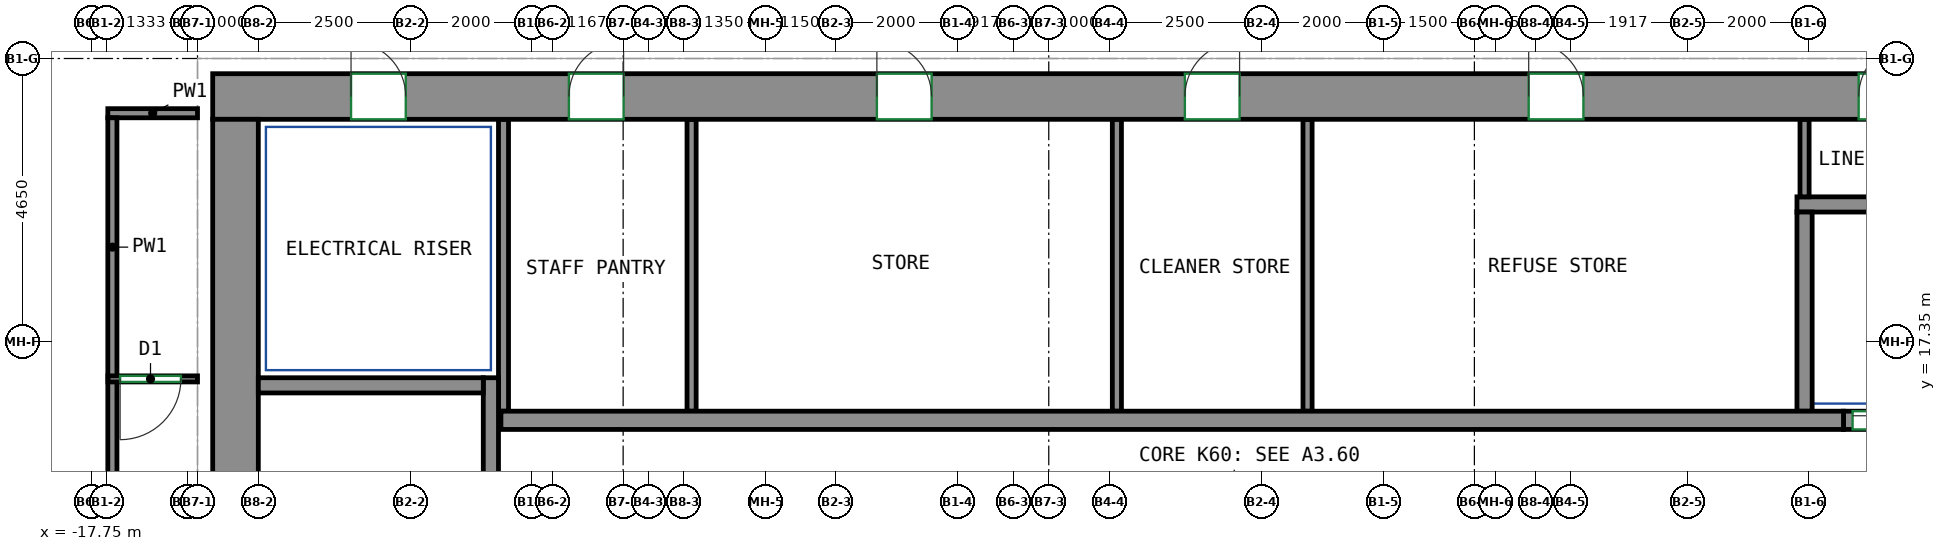
"""IFC4 building model, lengths in metres.
Left out: names, types, materials, properties, quantities, classifications, styles, units other than length and angle.
Written with IfcOpenShell. Run it as: python <this file> out.ifc"""

import sys

from ifc_helpers import new_model, si_unit, direction, frame, frame_2d, origin, place, context, subcontext, project, spatial, rectangle, extrude, source, transform, mapped, element, fill, save


model = new_model("IFC4")
c1 = context("Model", 3, precision=1e-05, world=origin(), true_north=direction((0.0, 1.0)))
c2 = subcontext(c1, "Body", "Model", "MODEL_VIEW")
j1 = project(units=[si_unit("LENGTHUNIT", "METRE"), si_unit("PLANEANGLEUNIT", "RADIAN")], contexts=[c1])
p1 = place(None, origin())
s1 = spatial("IfcSite", under=j1, at=p1, CompositionType="ELEMENT")
p2 = place(p1, origin())
s2 = spatial("IfcBuilding", under=s1, at=p2, CompositionType="ELEMENT")
p3 = place(p2, frame((0.0, 0.0, 245.8)))
s3 = spatial("IfcBuildingStorey", under=s2, at=p3, CompositionType="ELEMENT", Elevation=245.8)
m1 = source(origin(), c2, "Body", "SweptSolid", [
    extrude(rectangle(XDim=33.6, YDim=0.75, at=frame_2d((16.8, 0.0))), origin(), (0.0, 0.0, 1.0), 3.12),
])
p4 = place(p3, frame((-15.75, 21.375, 0.0), z_axis=(0.0, 0.0, 1.0), x_axis=(1.0, 0.0, 0.0)))
e1 = element("IfcWall", 1, at=p4, inside=s3, PredefinedType="SHEAR", context=c2, shape_type="MappedRepresentation", body=[
    mapped(m1, transform((0.0, 0.0, 0.0))),
])
p5 = place(p4, frame((5.858, 0.0, 0.0)))
e2 = element("IfcOpeningElement", 2, at=p5, cuts=e1, PredefinedType="OPENING", context=c2, shape_type="SweptSolid", body=[
    extrude(rectangle(XDim=0.9, YDim=2.1, at=frame_2d((0.45, 1.05))), frame((0.0, 0.385, 0.0), z_axis=(0.0, -1.0, 0.0), x_axis=(1.0, 0.0, 0.0)), (0.0, 0.0, 1.0), 0.77),
])
p6 = place(p4, frame((10.923, 0.0, 0.0)))
e3 = element("IfcOpeningElement", 3, at=p6, cuts=e1, PredefinedType="OPENING", context=c2, shape_type="SweptSolid", body=[
    extrude(rectangle(XDim=0.9, YDim=2.1, at=frame_2d((0.45, 1.05))), frame((0.0, 0.385, 0.0), z_axis=(0.0, -1.0, 0.0), x_axis=(1.0, 0.0, 0.0)), (0.0, 0.0, 1.0), 0.77),
])
p7 = place(p4, frame((15.988, 0.0, 0.0)))
e4 = element("IfcOpeningElement", 4, at=p7, cuts=e1, PredefinedType="OPENING", context=c2, shape_type="SweptSolid", body=[
    extrude(rectangle(XDim=0.9, YDim=2.1, at=frame_2d((0.45, 1.05))), frame((0.0, 0.385, 0.0), z_axis=(0.0, -1.0, 0.0), x_axis=(1.0, 0.0, 0.0)), (0.0, 0.0, 1.0), 0.77),
])
p8 = place(p4, frame((21.643, 0.0, 0.0)))
e5 = element("IfcOpeningElement", 5, at=p8, cuts=e1, PredefinedType="OPENING", context=c2, shape_type="SweptSolid", body=[
    extrude(rectangle(XDim=0.9, YDim=2.1, at=frame_2d((0.45, 1.05))), frame((0.0, 0.385, 0.0), z_axis=(0.0, -1.0, 0.0), x_axis=(1.0, 0.0, 0.0)), (0.0, 0.0, 1.0), 0.77),
])
p9 = place(p4, frame((27.07, 0.0, 0.0)))
e6 = element("IfcOpeningElement", 6, at=p9, cuts=e1, PredefinedType="OPENING", context=c2, shape_type="SweptSolid", body=[
    extrude(rectangle(XDim=0.9, YDim=2.1, at=frame_2d((0.45, 1.05))), frame((0.0, 0.385, 0.0), z_axis=(0.0, -1.0, 0.0), x_axis=(1.0, 0.0, 0.0)), (0.0, 0.0, 1.0), 0.77),
])
p10 = place(p4, frame((2.275, 0.0, 0.0)))
e7 = element("IfcOpeningElement", 7, at=p10, cuts=e1, PredefinedType="OPENING", context=c2, shape_type="SweptSolid", body=[
    extrude(rectangle(XDim=0.9, YDim=2.1, at=frame_2d((0.45, 1.05))), frame((0.0, 0.385, 0.0), z_axis=(0.0, -1.0, 0.0), x_axis=(1.0, 0.0, 0.0)), (0.0, 0.0, 1.0), 0.77),
])
p11 = place(p4, frame((30.425, 0.0, 0.0)))
e8 = element("IfcOpeningElement", 8, at=p11, cuts=e1, PredefinedType="OPENING", context=c2, shape_type="SweptSolid", body=[
    extrude(rectangle(XDim=0.9, YDim=2.1, at=frame_2d((0.45, 1.05))), frame((0.0, 0.385, 0.0), z_axis=(0.0, -1.0, 0.0), x_axis=(1.0, 0.0, 0.0)), (0.0, 0.0, 1.0), 0.77),
])
m2 = source(origin(), c2, "Body", "SweptSolid", [
    extrude(rectangle(XDim=12.0, YDim=0.75, at=frame_2d((6.0, 0.0))), origin(), (0.0, 0.0, 1.0), 3.12),
])
p12 = place(p3, frame((-15.375, 9.0, 0.0), z_axis=(0.0, 0.0, 1.0), x_axis=(0.0, 1.0, 0.0)))
e9 = element("IfcWall", 9, at=p12, inside=s3, PredefinedType="SHEAR", context=c2, shape_type="MappedRepresentation", body=[
    mapped(m2, transform((0.0, 0.0, 0.0))),
])
m3 = source(origin(), c2, "Body", "SweptSolid", [
    extrude(rectangle(XDim=7.75, YDim=0.25, at=frame_2d((3.875, 0.0))), origin(), (0.0, 0.0, 1.0), 3.12),
])
p13 = place(p3, frame((-11.175, 9.0, 0.0), z_axis=(0.0, 0.0, 1.0), x_axis=(0.0, 1.0, 0.0)))
e10 = element("IfcWall", 10, at=p13, inside=s3, PredefinedType="SHEAR", context=c2, shape_type="MappedRepresentation", body=[
    mapped(m3, transform((0.0, 0.0, 0.0))),
])
m4 = source(origin(), c2, "Body", "SweptSolid", [
    extrude(rectangle(XDim=3.7, YDim=0.25, at=frame_2d((1.85, 0.0))), origin(), (0.0, 0.0, 1.0), 3.12),
])
p14 = place(p3, frame((-15.0, 16.625, 0.0), z_axis=(0.0, 0.0, 1.0), x_axis=(1.0, 0.0, 0.0)))
e11 = element("IfcWall", 11, at=p14, inside=s3, PredefinedType="SHEAR", context=c2, shape_type="MappedRepresentation", body=[
    mapped(m4, transform((0.0, 0.0, 0.0))),
])
m5 = source(origin(), c2, "Body", "SweptSolid", [
    extrude(rectangle(XDim=22.08, YDim=0.3, at=frame_2d((11.04, 0.0))), origin(), (0.0, 0.0, 1.0), 3.12),
])
p15 = place(p3, frame((-11.01, 16.05, 0.0), z_axis=(0.0, 0.0, 1.0), x_axis=(1.0, 0.0, 0.0)))
e12 = element("IfcWall", 12, at=p15, inside=s3, PredefinedType="SHEAR", context=c2, shape_type="MappedRepresentation", body=[
    mapped(m5, transform((0.0, 0.0, 0.0))),
])
m6 = source(origin(), c2, "Body", "SweptSolid", [
    extrude(rectangle(XDim=1.4, YDim=0.3, at=frame_2d((0.7, 0.0))), origin(), (0.0, 0.0, 1.0), 3.12),
])
p16 = place(p3, frame((11.07, 16.05, 0.0), z_axis=(0.0, 0.0, 1.0), x_axis=(1.0, 0.0, 0.0)))
e13 = element("IfcWall", 13, at=p16, inside=s3, PredefinedType="PARTITIONING", context=c2, shape_type="MappedRepresentation", body=[
    mapped(m6, transform((0.0, 0.0, 0.0))),
])
p17 = place(p16, frame((0.15, 0.0, 0.0)))
e14 = element("IfcOpeningElement", 14, at=p17, cuts=e13, PredefinedType="OPENING", context=c2, shape_type="SweptSolid", body=[
    extrude(rectangle(XDim=1.1, YDim=2.1, at=frame_2d((0.55, 1.05))), frame((0.0, 0.16, 0.0), z_axis=(0.0, -1.0, 0.0), x_axis=(1.0, 0.0, 0.0)), (0.0, 0.0, 1.0), 0.32),
])
m7 = source(origin(), c2, "Body", "SweptSolid", [
    extrude(rectangle(XDim=2.93, YDim=0.25, at=frame_2d((1.465, 0.0))), origin(), (0.0, 0.0, 1.0), 3.12),
])
p18 = place(p3, frame((10.305, 19.6, 0.0), z_axis=(0.0, 0.0, 1.0), x_axis=(1.0, 0.0, 0.0)))
e15 = element("IfcWall", 15, at=p18, inside=s3, PredefinedType="PARTITIONING", context=c2, shape_type="MappedRepresentation", body=[
    mapped(m7, transform((0.0, 0.0, 0.0))),
])
m8 = source(origin(), c2, "Body", "SweptSolid", [
    extrude(rectangle(XDim=4.8, YDim=0.165, at=frame_2d((2.4, 0.0))), origin(), (0.0, 0.0, 1.0), 3.12),
])
p19 = place(p3, frame((-10.968, 16.2, 0.0), z_axis=(0.0, 0.0, 1.0), x_axis=(0.0, 1.0, 0.0)))
e16 = element("IfcWall", 16, at=p19, inside=s3, PredefinedType="PARTITIONING", context=c2, shape_type="MappedRepresentation", body=[
    mapped(m8, transform((0.0, 0.0, 0.0))),
])
m9 = source(origin(), c2, "Body", "SweptSolid", [
    extrude(rectangle(XDim=3.275, YDim=0.25, at=frame_2d((1.638, 0.0))), origin(), (0.0, 0.0, 1.0), 3.12),
])
p20 = place(p3, frame((10.43, 16.2, 0.0), z_axis=(0.0, 0.0, 1.0), x_axis=(0.0, 1.0, 0.0)))
e17 = element("IfcWall", 17, at=p20, inside=s3, PredefinedType="PARTITIONING", context=c2, shape_type="MappedRepresentation", body=[
    mapped(m9, transform((0.0, 0.0, 0.0))),
])
m10 = source(origin(), c2, "Body", "SweptSolid", [
    extrude(rectangle(XDim=4.8, YDim=0.15, at=frame_2d((2.4, 0.0))), origin(), (0.0, 0.0, 1.0), 3.12),
])
for number, where, z_axis, x_axis in (
    (18, (-7.875, 16.2, 0.0), (0.0, 0.0, 1.0), (0.0, 1.0, 0.0)),
    (19, (-0.88, 16.2, 0.0), (0.0, 0.0, 1.0), (0.0, 1.0, 0.0)),
    (20, (2.256, 16.2, 0.0), (0.0, 0.0, 1.0), (0.0, 1.0, 0.0)),
):
    element("IfcWall", number, at=place(p3, frame(where, z_axis=z_axis, x_axis=x_axis)), inside=s3, PredefinedType="PARTITIONING", context=c2, shape_type="MappedRepresentation", body=[
        mapped(m10, transform((0.0, 0.0, 0.0))),
    ])
m11 = source(origin(), c2, "Body", "SweptSolid", [
    extrude(rectangle(XDim=1.275, YDim=0.15, at=frame_2d((0.637, 0.0))), origin(), (0.0, 0.0, 1.0), 3.12),
])
p21 = place(p3, frame((10.43, 19.725, 0.0), z_axis=(0.0, 0.0, 1.0), x_axis=(0.0, 1.0, 0.0)))
e21 = element("IfcWall", 21, at=p21, inside=s3, PredefinedType="PARTITIONING", context=c2, shape_type="MappedRepresentation", body=[
    mapped(m11, transform((0.0, 0.0, 0.0))),
])
p22 = place(p3, frame((-17.4, 4.214, 0.0), z_axis=(0.0, 0.0, 1.0), x_axis=(0.0, 1.0, 0.0)))
e22 = element("IfcWall", 22, at=p22, inside=s3, PredefinedType="PARTITIONING", context=c2, shape_type="SweptSolid", body=[
    extrude(rectangle(XDim=12.477, YDim=0.15, at=frame_2d((6.238, 0.0))), origin(), (0.0, 0.0, 1.0), 3.12),
])
p23 = place(p3, frame((-17.475, 21.1, 0.0), z_axis=(0.0, 0.0, 1.0), x_axis=(1.0, 0.0, 0.0)))
e23 = element("IfcWall", 23, at=p23, inside=s3, PredefinedType="PARTITIONING", context=c2, shape_type="SweptSolid", body=[
    extrude(rectangle(XDim=1.475, YDim=0.15, at=frame_2d((0.738, 0.0))), origin(), (0.0, 0.0, 1.0), 3.12),
])
p24 = place(p3, frame((-17.4, 16.771, 0.0), z_axis=(0.0, 0.0, 1.0), x_axis=(0.0, 1.0, 0.0)))
e24 = element("IfcWall", 24, at=p24, inside=s3, PredefinedType="PARTITIONING", context=c2, shape_type="SweptSolid", body=[
    extrude(rectangle(XDim=4.254, YDim=0.15, at=frame_2d((2.127, 0.0))), origin(), (0.0, 0.0, 1.0), 3.12),
])
p25 = place(p3, frame((-16.0, 16.731, 0.0), z_axis=(0.0, 0.0, 1.0), x_axis=(-1.0, 0.0, 0.0)))
e25 = element("IfcWall", 25, at=p25, inside=s3, PredefinedType="PARTITIONING", context=c2, shape_type="SweptSolid", body=[
    extrude(rectangle(XDim=1.473, YDim=0.1, at=frame_2d((0.736, 0.0))), origin(), (0.0, 0.0, 1.0), 3.12),
])
p26 = place(p25, frame((0.273, 0.0, 0.0)))
e26 = element("IfcOpeningElement", 26, at=p26, cuts=e25, PredefinedType="OPENING", context=c2, shape_type="SweptSolid", body=[
    extrude(rectangle(XDim=1.0, YDim=2.1, at=frame_2d((0.5, 1.05))), frame((0.0, 0.06, 0.0), z_axis=(0.0, -1.0, 0.0), x_axis=(1.0, 0.0, 0.0)), (0.0, 0.0, 1.0), 0.12),
])
p27 = place(p17, origin())
e27 = element("IfcDoor", 27, at=p27, inside=s3, OperationType="DOUBLE_DOOR_SLIDING", PredefinedType="DOOR", context=c2, shape_type="SweptSolid", body=[
    extrude(rectangle(XDim=1.1, YDim=2.1, at=frame_2d((0.55, 1.05))), frame((0.0, 0.025, 0.0), z_axis=(0.0, -1.0, 0.0), x_axis=(1.0, 0.0, 0.0)), (0.0, 0.0, 1.0), 0.05),
])
fill(e14, e27)
p28 = place(p5, origin())
e28 = element("IfcDoor", 28, at=p28, inside=s3, OperationType="SINGLE_SWING_RIGHT", PredefinedType="DOOR", context=c2, shape_type="SweptSolid", body=[
    extrude(rectangle(XDim=0.9, YDim=2.1, at=frame_2d((0.45, 1.05))), frame((0.0, -0.23, 0.0), z_axis=(0.0, -1.0, 0.0), x_axis=(1.0, 0.0, 0.0)), (0.0, 0.0, 1.0), 0.05),
])
fill(e2, e28)
p29 = place(p6, origin())
e29 = element("IfcDoor", 29, at=p29, inside=s3, OperationType="SINGLE_SWING_LEFT", PredefinedType="DOOR", context=c2, shape_type="SweptSolid", body=[
    extrude(rectangle(XDim=0.9, YDim=2.1, at=frame_2d((0.45, 1.05))), frame((0.0, -0.23, 0.0), z_axis=(0.0, -1.0, 0.0), x_axis=(1.0, 0.0, 0.0)), (0.0, 0.0, 1.0), 0.05),
])
fill(e3, e29)
p30 = place(p7, origin())
e30 = element("IfcDoor", 30, at=p30, inside=s3, OperationType="SINGLE_SWING_RIGHT", PredefinedType="DOOR", context=c2, shape_type="SweptSolid", body=[
    extrude(rectangle(XDim=0.9, YDim=2.1, at=frame_2d((0.45, 1.05))), frame((0.0, -0.23, 0.0), z_axis=(0.0, -1.0, 0.0), x_axis=(1.0, 0.0, 0.0)), (0.0, 0.0, 1.0), 0.05),
])
fill(e4, e30)
p31 = place(p8, origin())
e31 = element("IfcDoor", 31, at=p31, inside=s3, OperationType="SINGLE_SWING_LEFT", PredefinedType="DOOR", context=c2, shape_type="SweptSolid", body=[
    extrude(rectangle(XDim=0.9, YDim=2.1, at=frame_2d((0.45, 1.05))), frame((0.0, -0.23, 0.0), z_axis=(0.0, -1.0, 0.0), x_axis=(1.0, 0.0, 0.0)), (0.0, 0.0, 1.0), 0.05),
])
fill(e5, e31)
p32 = place(p9, origin())
e32 = element("IfcDoor", 32, at=p32, inside=s3, OperationType="SINGLE_SWING_RIGHT", PredefinedType="DOOR", context=c2, shape_type="SweptSolid", body=[
    extrude(rectangle(XDim=0.9, YDim=2.1, at=frame_2d((0.45, 1.05))), frame((0.0, -0.23, 0.0), z_axis=(0.0, -1.0, 0.0), x_axis=(1.0, 0.0, 0.0)), (0.0, 0.0, 1.0), 0.05),
])
fill(e6, e32)
p33 = place(p10, origin())
e33 = element("IfcDoor", 33, at=p33, inside=s3, OperationType="SINGLE_SWING_LEFT", PredefinedType="DOOR", context=c2, shape_type="SweptSolid", body=[
    extrude(rectangle(XDim=0.9, YDim=2.1, at=frame_2d((0.45, 1.05))), frame((0.0, -0.23, 0.0), z_axis=(0.0, -1.0, 0.0), x_axis=(1.0, 0.0, 0.0)), (0.0, 0.0, 1.0), 0.05),
])
fill(e7, e33)
p34 = place(p26, origin())
e34 = element("IfcDoor", 34, at=p34, inside=s3, OperationType="SINGLE_SWING_RIGHT", PredefinedType="DOOR", context=c2, shape_type="SweptSolid", body=[
    extrude(rectangle(XDim=1.0, YDim=2.1, at=frame_2d((0.5, 1.05))), frame((0.0, 0.025, 0.0), z_axis=(0.0, -1.0, 0.0), x_axis=(1.0, 0.0, 0.0)), (0.0, 0.0, 1.0), 0.05),
])
fill(e26, e34)
save(model, sys.argv[1])
